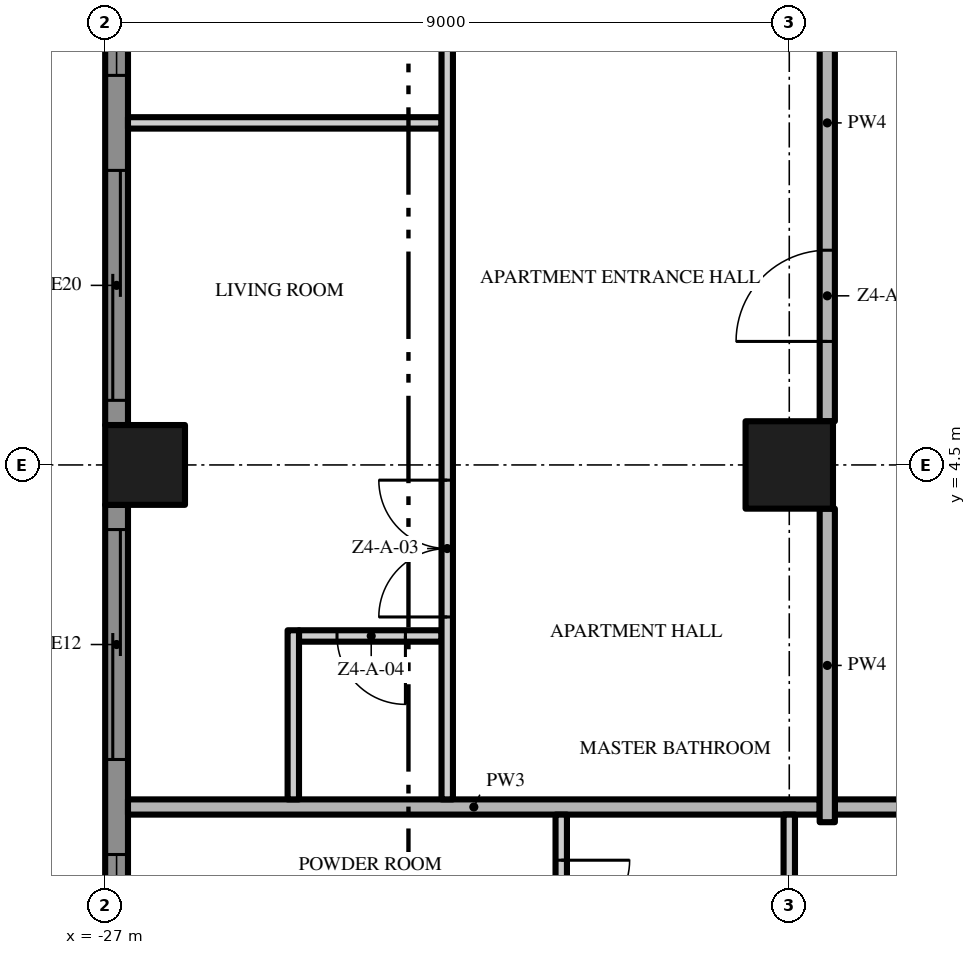
"""IFC4 building model, lengths in metres.
Left out: names, types, materials, properties, quantities, classifications, styles, units other than length and angle.
Written with IfcOpenShell. Run it as: python <this file> out.ifc"""

import sys

from ifc_helpers import new_model, si_unit, direction, frame, frame_2d, origin, origin_2d, place, context, subcontext, project, spatial, polyline, rectangle, outline, extrude, element, fill, save


model = new_model("IFC4")
c1 = context("Model", 3, precision=1e-05, world=origin(), true_north=direction((0.0, 1.0)))
c2 = subcontext(c1, "Body", "Model", "MODEL_VIEW")
j1 = project(units=[si_unit("LENGTHUNIT", "METRE"), si_unit("PLANEANGLEUNIT", "RADIAN")], contexts=[c1])
p1 = place(None, origin())
s1 = spatial("IfcSite", under=j1, at=p1, CompositionType="ELEMENT")
p2 = place(p1, origin())
s2 = spatial("IfcBuilding", under=s1, at=p2, CompositionType="ELEMENT")
p3 = place(p2, frame((0.0, 0.0, 192.0)))
s3 = spatial("IfcBuildingStorey", under=s2, at=p3, CompositionType="ELEMENT", Elevation=192.0)
p4 = place(p3, frame((-18.0, 4.5, 0.0), z_axis=(0.0, 0.0, 1.0), x_axis=(1.0, 0.0, 0.0)))
e1 = element("IfcColumn", 1, at=p4, inside=s3, PredefinedType="COLUMN", context=c2, shape_type="SweptSolid", body=[
    extrude(rectangle(XDim=1.15, YDim=1.15, at=origin_2d()), origin(), (0.0, 0.0, 1.0), 3.5),
])
p5 = place(p3, frame((-26.475, 4.5, 0.0), z_axis=(0.0, 0.0, 1.0), x_axis=(1.0, 0.0, 0.0)))
e2 = element("IfcColumn", 2, at=p5, inside=s3, PredefinedType="COLUMN", context=c2, shape_type="SweptSolid", body=[
    extrude(rectangle(XDim=1.05, YDim=1.05, at=origin_2d()), origin(), (0.0, 0.0, 1.0), 3.5),
])
p6 = place(p3, frame((-26.85, 5.025, 0.0), z_axis=(0.0, 0.0, 1.0), x_axis=(0.0, 1.0, 0.0)))
e3 = element("IfcWall", 3, at=p6, inside=s3, PredefinedType="SOLIDWALL", context=c2, shape_type="SweptSolid", body=[
    extrude(rectangle(XDim=7.95, YDim=0.3, at=frame_2d((3.975, 0.0))), origin(), (0.0, 0.0, 1.0), 3.5),
])
p7 = place(p6, frame((4.6, 0.0, 0.45)))
e4 = element("IfcOpeningElement", 4, at=p7, cuts=e3, PredefinedType="OPENING", context=c2, shape_type="SweptSolid", body=[
    extrude(rectangle(XDim=3.025, YDim=2.65, at=frame_2d((1.512, 1.325))), frame((0.0, 0.16, 0.0), z_axis=(0.0, -1.0, 0.0), x_axis=(1.0, 0.0, 0.0)), (0.0, 0.0, 1.0), 0.32),
])
p8 = place(p6, frame((0.325, 0.0, 0.0)))
e5 = element("IfcOpeningElement", 5, at=p8, cuts=e3, PredefinedType="OPENING", context=c2, shape_type="SweptSolid", body=[
    extrude(rectangle(XDim=3.025, YDim=2.4, at=frame_2d((1.512, 1.2))), frame((0.0, 0.16, 0.0), z_axis=(0.0, -1.0, 0.0), x_axis=(1.0, 0.0, 0.0)), (0.0, 0.0, 1.0), 0.32),
])
p9 = place(p3, frame((-26.85, -3.975, 0.0), z_axis=(0.0, 0.0, 1.0), x_axis=(0.0, 1.0, 0.0)))
e6 = element("IfcWall", 6, at=p9, inside=s3, PredefinedType="SOLIDWALL", context=c2, shape_type="SweptSolid", body=[
    extrude(rectangle(XDim=7.95, YDim=0.3, at=frame_2d((3.975, 0.0))), origin(), (0.0, 0.0, 1.0), 3.5),
])
p10 = place(p9, frame((4.6, 0.0, 0.0)))
e7 = element("IfcOpeningElement", 7, at=p10, cuts=e6, PredefinedType="OPENING", context=c2, shape_type="SweptSolid", body=[
    extrude(rectangle(XDim=3.025, YDim=2.4, at=frame_2d((1.512, 1.2))), frame((0.0, 0.16, 0.0), z_axis=(0.0, -1.0, 0.0), x_axis=(1.0, 0.0, 0.0)), (0.0, 0.0, 1.0), 0.32),
])
p11 = place(p9, frame((0.325, 0.0, 0.45)))
e8 = element("IfcOpeningElement", 8, at=p11, cuts=e6, PredefinedType="OPENING", context=c2, shape_type="SweptSolid", body=[
    extrude(rectangle(XDim=3.025, YDim=2.65, at=frame_2d((1.512, 1.325))), frame((0.0, 0.16, 0.0), z_axis=(0.0, -1.0, 0.0), x_axis=(1.0, 0.0, 0.0)), (0.0, 0.0, 1.0), 0.32),
])
p12 = place(p3, origin())
e9 = element("IfcWall", 9, at=p12, inside=s3, PredefinedType="USERDEFINED", context=c2, shape_type="SweptSolid", body=[
    extrude(outline(polyline([(-29.649, 18.0), (-28.988, 16.5), (-28.255, 15.0), (-27.731, 13.5), (-27.6, 12.375), (-27.615, 12.0), (-27.951, 10.5), (-28.612, 9.0), (-29.345, 7.5), (-29.869, 6.0), (-30.0, 4.875), (-29.985, 4.5), (-29.649, 3.0), (-28.988, 1.5), (-28.255, 0.0), (-27.731, -1.5), (-27.6, -2.625), (-27.615, -3.0), (-27.951, -4.5), (-28.612, -6.0), (-29.345, -7.5), (-29.869, -9.0), (-30.0, -10.125), (-29.985, -10.5), (-29.649, -12.0), (-28.988, -13.5), (-28.255, -15.0), (-27.731, -16.5), (-27.6, -17.625), (-27.615, -18.0), (-27.365, -18.01), (-27.349, -17.615), (-27.486, -16.444), (-28.024, -14.904), (-28.761, -13.395), (-29.41, -11.921), (-29.736, -10.467), (-29.749, -10.135), (-29.624, -9.056), (-29.114, -7.596), (-28.385, -6.105), (-27.713, -4.579), (-27.366, -3.033), (-27.349, -2.615), (-27.486, -1.444), (-28.024, 0.096), (-28.761, 1.605), (-29.41, 3.079), (-29.736, 4.533), (-29.749, 4.865), (-29.624, 5.944), (-29.114, 7.404), (-28.385, 8.895), (-27.713, 10.421), (-27.366, 11.967), (-27.349, 12.385), (-27.486, 13.556), (-28.024, 15.096), (-28.761, 16.605), (-29.42, 18.101), (-29.649, 18.0)])), origin(), (0.0, 0.0, 1.0), 0.9),
])
p13 = place(p3, frame((-17.4, 0.0, 0.0), z_axis=(0.0, 0.0, 1.0), x_axis=(1.0, 0.0, 0.0)))
e10 = element("IfcWall", 10, at=p13, inside=s3, PredefinedType="PARTITIONING", context=c2, shape_type="SweptSolid", body=[
    extrude(rectangle(XDim=12.8, YDim=0.2, at=frame_2d((6.4, 0.0))), origin(), (0.0, 0.0, 1.0), 3.5),
])
p14 = place(p3, frame((-26.7, 0.0, 0.0), z_axis=(0.0, 0.0, 1.0), x_axis=(1.0, 0.0, 0.0)))
e11 = element("IfcWall", 11, at=p14, inside=s3, PredefinedType="PARTITIONING", context=c2, shape_type="SweptSolid", body=[
    extrude(rectangle(XDim=9.1, YDim=0.2, at=frame_2d((4.55, 0.0))), origin(), (0.0, 0.0, 1.0), 3.5),
])
p15 = place(p3, frame((-22.575, 2.25, 0.0), z_axis=(0.0, 0.0, 1.0), x_axis=(-1.0, 0.0, 0.0)))
e12 = element("IfcWall", 12, at=p15, inside=s3, PredefinedType="PARTITIONING", context=c2, shape_type="SweptSolid", body=[
    extrude(rectangle(XDim=1.875, YDim=0.15, at=frame_2d((0.938, 0.0))), origin(), (0.0, 0.0, 1.0), 3.5),
])
p16 = place(p15, frame((0.475, 0.0, 0.0)))
e13 = element("IfcOpeningElement", 13, at=p16, cuts=e12, PredefinedType="OPENING", context=c2, shape_type="SweptSolid", body=[
    extrude(rectangle(XDim=0.9, YDim=2.1, at=frame_2d((0.45, 1.05))), frame((0.0, 0.085, 0.0), z_axis=(0.0, -1.0, 0.0), x_axis=(1.0, 0.0, 0.0)), (0.0, 0.0, 1.0), 0.17),
])
p17 = place(p3, frame((-26.7, 9.0, 0.0), z_axis=(0.0, 0.0, 1.0), x_axis=(1.0, 0.0, 0.0)))
e14 = element("IfcWall", 14, at=p17, inside=s3, PredefinedType="PARTITIONING", context=c2, shape_type="SweptSolid", body=[
    extrude(rectangle(XDim=4.125, YDim=0.15, at=frame_2d((2.062, 0.0))), origin(), (0.0, 0.0, 1.0), 3.5),
])
p18 = place(p3, frame((-24.525, 0.1, 0.0), z_axis=(0.0, 0.0, 1.0), x_axis=(0.0, 1.0, 0.0)))
e15 = element("IfcWall", 15, at=p18, inside=s3, PredefinedType="PARTITIONING", context=c2, shape_type="SweptSolid", body=[
    extrude(rectangle(XDim=2.225, YDim=0.15, at=frame_2d((1.113, 0.0))), origin(), (0.0, 0.0, 1.0), 3.5),
])
p19 = place(p3, frame((-22.5, 0.1, 0.0), z_axis=(0.0, 0.0, 1.0), x_axis=(0.0, 1.0, 0.0)))
e16 = element("IfcWall", 16, at=p19, inside=s3, PredefinedType="PARTITIONING", context=c2, shape_type="SweptSolid", body=[
    extrude(rectangle(XDim=17.375, YDim=0.15, at=frame_2d((8.688, 0.0))), origin(), (0.0, 0.0, 1.0), 3.5),
])
p20 = place(p19, frame((2.4, 0.0, 0.0)))
e17 = element("IfcOpeningElement", 17, at=p20, cuts=e16, PredefinedType="OPENING", context=c2, shape_type="SweptSolid", body=[
    extrude(rectangle(XDim=1.8, YDim=2.4, at=frame_2d((0.9, 1.2))), frame((0.0, 0.085, 0.0), z_axis=(0.0, -1.0, 0.0), x_axis=(1.0, 0.0, 0.0)), (0.0, 0.0, 1.0), 0.17),
])
p21 = place(p19, frame((10.65, 0.0, 0.0)))
e18 = element("IfcOpeningElement", 18, at=p21, cuts=e16, PredefinedType="OPENING", context=c2, shape_type="SweptSolid", body=[
    extrude(rectangle(XDim=1.0, YDim=2.4, at=frame_2d((0.5, 1.2))), frame((0.0, 0.085, 0.0), z_axis=(0.0, -1.0, 0.0), x_axis=(1.0, 0.0, 0.0)), (0.0, 0.0, 1.0), 0.17),
])
p22 = place(p3, frame((-21.0, -0.1, 0.0), z_axis=(0.0, 0.0, 1.0), x_axis=(0.0, -1.0, 0.0)))
e19 = element("IfcWall", 19, at=p22, inside=s3, PredefinedType="PARTITIONING", context=c2, shape_type="SweptSolid", body=[
    extrude(rectangle(XDim=2.225, YDim=0.15, at=frame_2d((1.113, 0.0))), origin(), (0.0, 0.0, 1.0), 3.5),
])
p23 = place(p22, frame((0.6, 0.0, 0.0)))
e20 = element("IfcOpeningElement", 20, at=p23, cuts=e19, PredefinedType="OPENING", context=c2, shape_type="SweptSolid", body=[
    extrude(rectangle(XDim=0.9, YDim=2.1, at=frame_2d((0.45, 1.05))), frame((0.0, 0.085, 0.0), z_axis=(0.0, -1.0, 0.0), x_axis=(1.0, 0.0, 0.0)), (0.0, 0.0, 1.0), 0.17),
])
p24 = place(p3, frame((-18.0, -3.925, 0.0), z_axis=(0.0, 0.0, 1.0), x_axis=(0.0, 1.0, 0.0)))
e21 = element("IfcWall", 21, at=p24, inside=s3, PredefinedType="PARTITIONING", context=c2, shape_type="SweptSolid", body=[
    extrude(rectangle(XDim=3.825, YDim=0.15, at=frame_2d((1.913, 0.0))), origin(), (0.0, 0.0, 1.0), 3.5),
])
p25 = place(p24, frame((0.15, 0.0, 0.0)))
e22 = element("IfcOpeningElement", 22, at=p25, cuts=e21, PredefinedType="OPENING", context=c2, shape_type="SweptSolid", body=[
    extrude(rectangle(XDim=1.0, YDim=2.4, at=frame_2d((0.5, 1.2))), frame((0.0, 0.085, 0.0), z_axis=(0.0, -1.0, 0.0), x_axis=(1.0, 0.0, 0.0)), (0.0, 0.0, 1.0), 0.17),
])
p26 = place(p3, frame((-17.5, -0.2, 0.0), z_axis=(0.0, 0.0, 1.0), x_axis=(0.0, 1.0, 0.0)))
e23 = element("IfcWall", 23, at=p26, inside=s3, PredefinedType="PARTITIONING", context=c2, shape_type="SweptSolid", body=[
    extrude(rectangle(XDim=4.125, YDim=0.2, at=frame_2d((2.062, 0.0))), origin(), (0.0, 0.0, 1.0), 3.5),
])
p27 = place(p3, frame((-17.5, 5.075, 0.0), z_axis=(0.0, 0.0, 1.0), x_axis=(0.0, 1.0, 0.0)))
e24 = element("IfcWall", 24, at=p27, inside=s3, PredefinedType="PARTITIONING", context=c2, shape_type="SweptSolid", body=[
    extrude(rectangle(XDim=7.85, YDim=0.2, at=frame_2d((3.925, 0.0))), origin(), (0.0, 0.0, 1.0), 3.5),
])
p28 = place(p27, frame((1.05, 0.0, 0.0)))
e25 = element("IfcOpeningElement", 25, at=p28, cuts=e24, PredefinedType="OPENING", context=c2, shape_type="SweptSolid", body=[
    extrude(rectangle(XDim=1.2, YDim=2.4, at=frame_2d((0.6, 1.2))), frame((0.0, 0.11, 0.0), z_axis=(0.0, -1.0, 0.0), x_axis=(1.0, 0.0, 0.0)), (0.0, 0.0, 1.0), 0.22),
])
p29 = place(p7, origin())
e26 = element("IfcWindow", 26, at=p29, inside=s3, PartitioningType="SINGLE_PANEL", PredefinedType="WINDOW", context=c2, shape_type="SweptSolid", body=[
    extrude(rectangle(XDim=3.025, YDim=2.65, at=frame_2d((1.512, 1.325))), frame((0.0, 0.03, 0.0), z_axis=(0.0, -1.0, 0.0), x_axis=(1.0, 0.0, 0.0)), (0.0, 0.0, 1.0), 0.06),
])
fill(e4, e26)
p30 = place(p8, origin())
e27 = element("IfcDoor", 27, at=p30, inside=s3, OperationType="SINGLE_SWING_LEFT", PredefinedType="DOOR", context=c2, shape_type="SweptSolid", body=[
    extrude(rectangle(XDim=3.025, YDim=2.4, at=frame_2d((1.512, 1.2))), frame((0.0, 0.025, 0.0), z_axis=(0.0, -1.0, 0.0), x_axis=(1.0, 0.0, 0.0)), (0.0, 0.0, 1.0), 0.05),
])
fill(e5, e27)
p31 = place(p10, origin())
e28 = element("IfcDoor", 28, at=p31, inside=s3, OperationType="SINGLE_SWING_LEFT", PredefinedType="DOOR", context=c2, shape_type="SweptSolid", body=[
    extrude(rectangle(XDim=3.025, YDim=2.4, at=frame_2d((1.512, 1.2))), frame((0.0, 0.025, 0.0), z_axis=(0.0, -1.0, 0.0), x_axis=(1.0, 0.0, 0.0)), (0.0, 0.0, 1.0), 0.05),
])
fill(e7, e28)
p32 = place(p11, origin())
e29 = element("IfcWindow", 29, at=p32, inside=s3, PartitioningType="SINGLE_PANEL", PredefinedType="WINDOW", context=c2, shape_type="SweptSolid", body=[
    extrude(rectangle(XDim=3.025, YDim=2.65, at=frame_2d((1.512, 1.325))), frame((0.0, 0.03, 0.0), z_axis=(0.0, -1.0, 0.0), x_axis=(1.0, 0.0, 0.0)), (0.0, 0.0, 1.0), 0.06),
])
fill(e8, e29)
p33 = place(p28, origin())
e30 = element("IfcDoor", 30, at=p33, inside=s3, OperationType="SINGLE_SWING_LEFT", PredefinedType="DOOR", context=c2, shape_type="SweptSolid", body=[
    extrude(rectangle(XDim=1.2, YDim=2.4, at=frame_2d((0.6, 1.2))), frame((0.0, 0.025, 0.0), z_axis=(0.0, -1.0, 0.0), x_axis=(1.0, 0.0, 0.0)), (0.0, 0.0, 1.0), 0.05),
])
fill(e25, e30)
p34 = place(p20, origin())
e31 = element("IfcDoor", 31, at=p34, inside=s3, OperationType="DOUBLE_DOOR_SINGLE_SWING", PredefinedType="DOOR", context=c2, shape_type="SweptSolid", body=[
    extrude(rectangle(XDim=1.8, YDim=2.4, at=frame_2d((0.9, 1.2))), frame((0.0, 0.025, 0.0), z_axis=(0.0, -1.0, 0.0), x_axis=(1.0, 0.0, 0.0)), (0.0, 0.0, 1.0), 0.05),
])
fill(e17, e31)
p35 = place(p16, origin())
e32 = element("IfcDoor", 32, at=p35, inside=s3, OperationType="SINGLE_SWING_LEFT", PredefinedType="DOOR", context=c2, shape_type="SweptSolid", body=[
    extrude(rectangle(XDim=0.9, YDim=2.1, at=frame_2d((0.45, 1.05))), frame((0.0, 0.025, 0.0), z_axis=(0.0, -1.0, 0.0), x_axis=(1.0, 0.0, 0.0)), (0.0, 0.0, 1.0), 0.05),
])
fill(e13, e32)
p36 = place(p23, origin())
e33 = element("IfcDoor", 33, at=p36, inside=s3, OperationType="SINGLE_SWING_LEFT", PredefinedType="DOOR", context=c2, shape_type="SweptSolid", body=[
    extrude(rectangle(XDim=0.9, YDim=2.1, at=frame_2d((0.45, 1.05))), frame((0.0, 0.025, 0.0), z_axis=(0.0, -1.0, 0.0), x_axis=(1.0, 0.0, 0.0)), (0.0, 0.0, 1.0), 0.05),
])
fill(e20, e33)
save(model, sys.argv[1])
